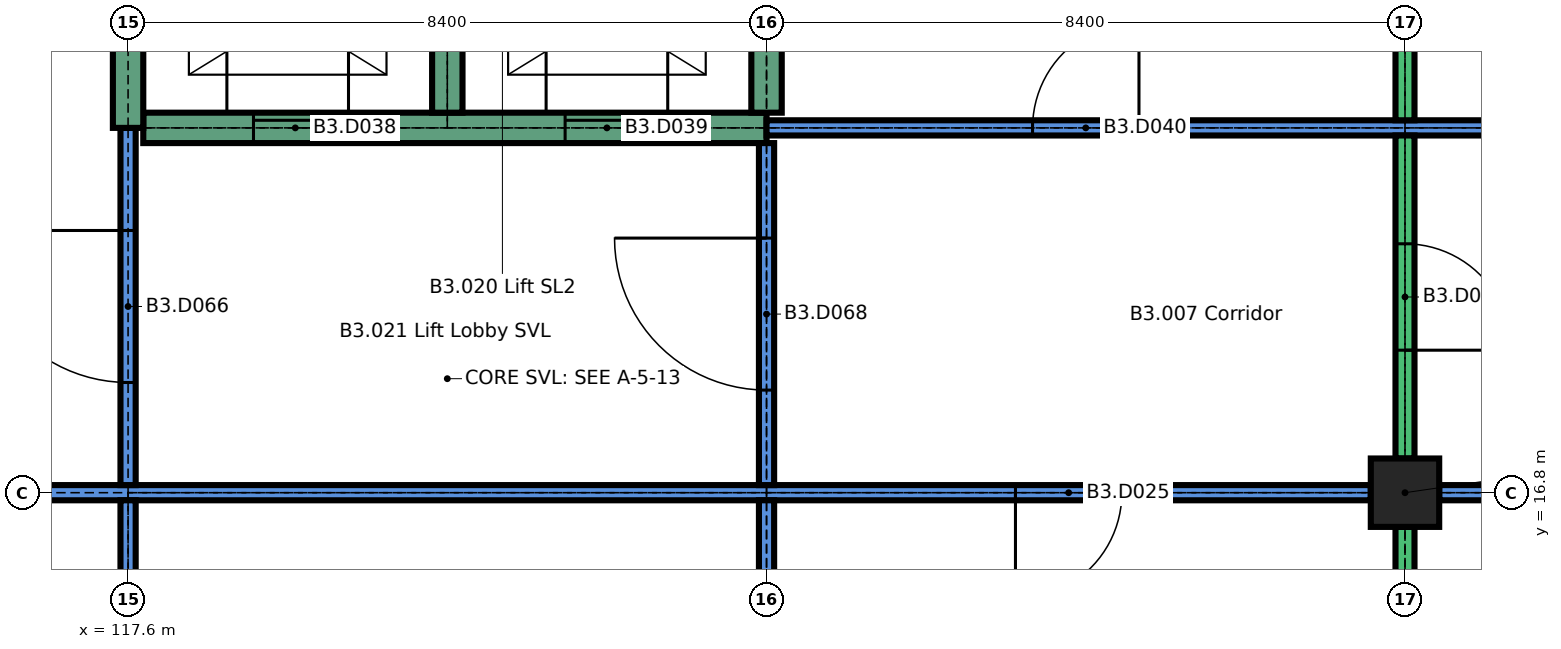
"""IFC4 building model, lengths in metres.
Left out: names, types, materials, properties, quantities, classifications, styles, units other than length and angle.
Written with IfcOpenShell. Run it as: python <this file> out.ifc"""

import sys

from ifc_helpers import new_model, si_unit, direction, frame, frame_2d, origin, origin_2d, place, context, subcontext, project, spatial, rectangle, extrude, element, fill, save


model = new_model("IFC4")
c1 = context("Model", 3, precision=1e-05, world=origin(), true_north=direction((0.0, 1.0)))
c2 = subcontext(c1, "Body", "Model", "MODEL_VIEW")
j1 = project(units=[si_unit("LENGTHUNIT", "METRE"), si_unit("PLANEANGLEUNIT", "RADIAN")], contexts=[c1])
p1 = place(None, origin())
s1 = spatial("IfcSite", under=j1, at=p1, CompositionType="ELEMENT")
p2 = place(p1, origin())
s2 = spatial("IfcBuilding", under=s1, at=p2, CompositionType="ELEMENT")
p3 = place(p2, frame((0.0, 0.0, -11.4)))
s3 = spatial("IfcBuildingStorey", under=s2, at=p3, CompositionType="ELEMENT", Elevation=-11.4)
p4 = place(p3, frame((134.4, 16.8, 0.0), z_axis=(0.0, 0.0, 1.0), x_axis=(1.0, 0.0, 0.0)))
e1 = element("IfcColumn", 1, at=p4, inside=s3, PredefinedType="COLUMN", context=c2, shape_type="SweptSolid", body=[
    extrude(rectangle(XDim=0.9, YDim=0.9, at=origin_2d()), origin(), (0.0, 0.0, 1.0), 3.2),
])
p5 = place(p3, frame((109.65, 16.8, 0.0), z_axis=(0.0, 0.0, 1.0), x_axis=(1.0, 0.0, 0.0)))
e2 = element("IfcWall", 2, at=p5, inside=s3, PredefinedType="PARTITIONING", context=c2, shape_type="SweptSolid", body=[
    extrude(rectangle(XDim=24.3, YDim=0.2, at=frame_2d((12.15, 0.0))), origin(), (0.0, 0.0, 1.0), 3.2),
])
p6 = place(p5, frame((3.275, 0.0, 0.0)))
e3 = element("IfcOpeningElement", 3, at=p6, cuts=e2, PredefinedType="OPENING", context=c2, shape_type="SweptSolid", body=[
    extrude(rectangle(XDim=1.4, YDim=2.1, at=frame_2d((0.7, 1.05))), frame((0.0, 0.11, 0.0), z_axis=(0.0, -1.0, 0.0), x_axis=(1.0, 0.0, 0.0)), (0.0, 0.0, 1.0), 0.22),
])
p7 = place(p5, frame((19.625, 0.0, 0.0)))
e4 = element("IfcOpeningElement", 4, at=p7, cuts=e2, PredefinedType="OPENING", context=c2, shape_type="SweptSolid", body=[
    extrude(rectangle(XDim=1.4, YDim=2.1, at=frame_2d((0.7, 1.05))), frame((0.0, 0.11, 0.0), z_axis=(0.0, -1.0, 0.0), x_axis=(1.0, 0.0, 0.0)), (0.0, 0.0, 1.0), 0.22),
])
p8 = place(p3, frame((134.85, 16.8, 0.0), z_axis=(0.0, 0.0, 1.0), x_axis=(1.0, 0.0, 0.0)))
e5 = element("IfcWall", 5, at=p8, inside=s3, PredefinedType="PARTITIONING", context=c2, shape_type="SweptSolid", body=[
    extrude(rectangle(XDim=7.5, YDim=0.2, at=frame_2d((3.75, 0.0))), origin(), (0.0, 0.0, 1.0), 3.2),
])
p9 = place(p8, frame((3.05, 0.0, 0.0)))
e6 = element("IfcOpeningElement", 6, at=p9, cuts=e5, PredefinedType="OPENING", context=c2, shape_type="SweptSolid", body=[
    extrude(rectangle(XDim=1.4, YDim=2.1, at=frame_2d((0.7, 1.05))), frame((0.0, 0.11, 0.0), z_axis=(0.0, -1.0, 0.0), x_axis=(1.0, 0.0, 0.0)), (0.0, 0.0, 1.0), 0.22),
])
p10 = place(p3, frame((117.8, 21.6, 0.0), z_axis=(0.0, 0.0, 1.0), x_axis=(1.0, 0.0, 0.0)))
e7 = element("IfcWall", 7, at=p10, inside=s3, PredefinedType="SHEAR", context=c2, shape_type="SweptSolid", body=[
    extrude(rectangle(XDim=8.2, YDim=0.4, at=frame_2d((4.1, 0.0))), origin(), (0.0, 0.0, 1.0), 3.2),
])
p11 = place(p10, frame((1.45, 0.0, 0.0)))
e8 = element("IfcOpeningElement", 8, at=p11, cuts=e7, PredefinedType="OPENING", context=c2, shape_type="SweptSolid", body=[
    extrude(rectangle(XDim=1.1, YDim=2.1, at=frame_2d((0.55, 1.05))), frame((0.0, 0.21, 0.0), z_axis=(0.0, -1.0, 0.0), x_axis=(1.0, 0.0, 0.0)), (0.0, 0.0, 1.0), 0.42),
])
p12 = place(p10, frame((5.55, 0.0, 0.0)))
e9 = element("IfcOpeningElement", 9, at=p12, cuts=e7, PredefinedType="OPENING", context=c2, shape_type="SweptSolid", body=[
    extrude(rectangle(XDim=1.1, YDim=2.1, at=frame_2d((0.55, 1.05))), frame((0.0, 0.21, 0.0), z_axis=(0.0, -1.0, 0.0), x_axis=(1.0, 0.0, 0.0)), (0.0, 0.0, 1.0), 0.42),
])
p13 = place(p3, frame((126.0, 21.6, 0.0), z_axis=(0.0, 0.0, 1.0), x_axis=(1.0, 0.0, 0.0)))
e10 = element("IfcWall", 10, at=p13, inside=s3, PredefinedType="PARTITIONING", context=c2, shape_type="SweptSolid", body=[
    extrude(rectangle(XDim=12.7, YDim=0.2, at=frame_2d((6.35, 0.0))), origin(), (0.0, 0.0, 1.0), 3.2),
])
p14 = place(p13, frame((3.5, 0.0, 0.0)))
e11 = element("IfcOpeningElement", 11, at=p14, cuts=e10, PredefinedType="OPENING", context=c2, shape_type="SweptSolid", body=[
    extrude(rectangle(XDim=1.4, YDim=2.1, at=frame_2d((0.7, 1.05))), frame((0.0, 0.11, 0.0), z_axis=(0.0, -1.0, 0.0), x_axis=(1.0, 0.0, 0.0)), (0.0, 0.0, 1.0), 0.22),
])
p15 = place(p13, frame((9.8, 0.0, 0.0)))
e12 = element("IfcOpeningElement", 12, at=p15, cuts=e10, PredefinedType="OPENING", context=c2, shape_type="SweptSolid", body=[
    extrude(rectangle(XDim=1.4, YDim=2.1, at=frame_2d((0.7, 1.05))), frame((0.0, 0.11, 0.0), z_axis=(0.0, -1.0, 0.0), x_axis=(1.0, 0.0, 0.0)), (0.0, 0.0, 1.0), 0.22),
])
p16 = place(p3, frame((117.6, 8.85, 0.0), z_axis=(0.0, 0.0, 1.0), x_axis=(0.0, 1.0, 0.0)))
e13 = element("IfcWall", 13, at=p16, inside=s3, PredefinedType="PARTITIONING", context=c2, shape_type="SweptSolid", body=[
    extrude(rectangle(XDim=7.85, YDim=0.2, at=frame_2d((3.925, 0.0))), origin(), (0.0, 0.0, 1.0), 3.2),
])
p17 = place(p16, frame((3.225, 0.0, 0.0)))
e14 = element("IfcOpeningElement", 14, at=p17, cuts=e13, PredefinedType="OPENING", context=c2, shape_type="SweptSolid", body=[
    extrude(rectangle(XDim=1.4, YDim=2.1, at=frame_2d((0.7, 1.05))), frame((0.0, 0.11, 0.0), z_axis=(0.0, -1.0, 0.0), x_axis=(1.0, 0.0, 0.0)), (0.0, 0.0, 1.0), 0.22),
])
p18 = place(p3, frame((117.6, 16.9, 0.0), z_axis=(0.0, 0.0, 1.0), x_axis=(0.0, 1.0, 0.0)))
e15 = element("IfcWall", 15, at=p18, inside=s3, PredefinedType="PARTITIONING", context=c2, shape_type="SweptSolid", body=[
    extrude(rectangle(XDim=4.7, YDim=0.2, at=frame_2d((2.35, 0.0))), origin(), (0.0, 0.0, 1.0), 3.2),
])
p19 = place(p18, frame((1.35, 0.0, 0.0)))
e16 = element("IfcOpeningElement", 16, at=p19, cuts=e15, PredefinedType="OPENING", context=c2, shape_type="SweptSolid", body=[
    extrude(rectangle(XDim=2.0, YDim=2.4, at=frame_2d((1.0, 1.2))), frame((0.0, 0.11, 0.0), z_axis=(0.0, -1.0, 0.0), x_axis=(1.0, 0.0, 0.0)), (0.0, 0.0, 1.0), 0.22),
])
p20 = place(p3, frame((117.6, 21.6, 0.0), z_axis=(0.0, 0.0, 1.0), x_axis=(0.0, 1.0, 0.0)))
e17 = element("IfcWall", 17, at=p20, inside=s3, PredefinedType="SHEAR", context=c2, shape_type="SweptSolid", body=[
    extrude(rectangle(XDim=3.6, YDim=0.4, at=frame_2d((1.8, 0.0))), origin(), (0.0, 0.0, 1.0), 3.2),
])
p21 = place(p3, frame((121.8, 21.8, 0.0), z_axis=(0.0, 0.0, 1.0), x_axis=(0.0, 1.0, 0.0)))
e18 = element("IfcWall", 18, at=p21, inside=s3, PredefinedType="SHEAR", context=c2, shape_type="SweptSolid", body=[
    extrude(rectangle(XDim=3.2, YDim=0.4, at=frame_2d((1.6, 0.0))), origin(), (0.0, 0.0, 1.0), 3.2),
])
p22 = place(p3, frame((126.0, 8.85, 0.0), z_axis=(0.0, 0.0, 1.0), x_axis=(0.0, 1.0, 0.0)))
e19 = element("IfcWall", 19, at=p22, inside=s3, PredefinedType="PARTITIONING", context=c2, shape_type="SweptSolid", body=[
    extrude(rectangle(XDim=7.85, YDim=0.2, at=frame_2d((3.925, 0.0))), origin(), (0.0, 0.0, 1.0), 3.2),
])
p23 = place(p3, frame((126.0, 16.9, 0.0), z_axis=(0.0, 0.0, 1.0), x_axis=(0.0, 1.0, 0.0)))
e20 = element("IfcWall", 20, at=p23, inside=s3, PredefinedType="PARTITIONING", context=c2, shape_type="SweptSolid", body=[
    extrude(rectangle(XDim=4.5, YDim=0.2, at=frame_2d((2.25, 0.0))), origin(), (0.0, 0.0, 1.0), 3.2),
])
p24 = place(p23, frame((1.25, 0.0, 0.0)))
e21 = element("IfcOpeningElement", 21, at=p24, cuts=e20, PredefinedType="OPENING", context=c2, shape_type="SweptSolid", body=[
    extrude(rectangle(XDim=2.0, YDim=2.4, at=frame_2d((1.0, 1.2))), frame((0.0, 0.11, 0.0), z_axis=(0.0, -1.0, 0.0), x_axis=(1.0, 0.0, 0.0)), (0.0, 0.0, 1.0), 0.22),
])
p25 = place(p3, frame((126.0, 21.8, 0.0), z_axis=(0.0, 0.0, 1.0), x_axis=(0.0, 1.0, 0.0)))
e22 = element("IfcWall", 22, at=p25, inside=s3, PredefinedType="SHEAR", context=c2, shape_type="SweptSolid", body=[
    extrude(rectangle(XDim=3.4, YDim=0.4, at=frame_2d((1.7, 0.0))), origin(), (0.0, 0.0, 1.0), 3.2),
])
p26 = place(p3, frame((134.4, 8.85, 0.0), z_axis=(0.0, 0.0, 1.0), x_axis=(0.0, 1.0, 0.0)))
e23 = element("IfcWall", 23, at=p26, inside=s3, PredefinedType="SOLIDWALL", context=c2, shape_type="SweptSolid", body=[
    extrude(rectangle(XDim=7.5, YDim=0.25, at=frame_2d((3.75, 0.0))), origin(), (0.0, 0.0, 1.0), 3.2),
])
p27 = place(p3, frame((134.4, 17.25, 0.0), z_axis=(0.0, 0.0, 1.0), x_axis=(0.0, 1.0, 0.0)))
e24 = element("IfcWall", 24, at=p27, inside=s3, PredefinedType="SOLIDWALL", context=c2, shape_type="SweptSolid", body=[
    extrude(rectangle(XDim=4.25, YDim=0.25, at=frame_2d((2.125, 0.0))), origin(), (0.0, 0.0, 1.0), 3.2),
])
p28 = place(p27, frame((1.425, 0.0, 0.0)))
e25 = element("IfcOpeningElement", 25, at=p28, cuts=e24, PredefinedType="OPENING", context=c2, shape_type="SweptSolid", body=[
    extrude(rectangle(XDim=1.4, YDim=2.1, at=frame_2d((0.7, 1.05))), frame((0.0, 0.135, 0.0), z_axis=(0.0, -1.0, 0.0), x_axis=(1.0, 0.0, 0.0)), (0.0, 0.0, 1.0), 0.27),
])
p29 = place(p3, frame((134.4, 21.7, 0.0), z_axis=(0.0, 0.0, 1.0), x_axis=(0.0, 1.0, 0.0)))
e26 = element("IfcWall", 26, at=p29, inside=s3, PredefinedType="SOLIDWALL", context=c2, shape_type="SweptSolid", body=[
    extrude(rectangle(XDim=3.05, YDim=0.25, at=frame_2d((1.525, 0.0))), origin(), (0.0, 0.0, 1.0), 3.2),
])
p30 = place(p7, origin())
e27 = element("IfcDoor", 27, at=p30, inside=s3, OperationType="SINGLE_SWING_LEFT", PredefinedType="DOOR", context=c2, shape_type="SweptSolid", body=[
    extrude(rectangle(XDim=1.4, YDim=2.1, at=frame_2d((0.7, 1.05))), frame((0.0, 0.025, 0.0), z_axis=(0.0, -1.0, 0.0), x_axis=(1.0, 0.0, 0.0)), (0.0, 0.0, 1.0), 0.05),
])
fill(e4, e27)
p31 = place(p11, origin())
e28 = element("IfcDoor", 28, at=p31, inside=s3, OperationType="SLIDING_TO_LEFT", PredefinedType="DOOR", context=c2, shape_type="SweptSolid", body=[
    extrude(rectangle(XDim=1.1, YDim=2.1, at=frame_2d((0.55, 1.05))), frame((0.0, 0.025, 0.0), z_axis=(0.0, -1.0, 0.0), x_axis=(1.0, 0.0, 0.0)), (0.0, 0.0, 1.0), 0.05),
])
fill(e8, e28)
p32 = place(p12, origin())
e29 = element("IfcDoor", 29, at=p32, inside=s3, OperationType="SLIDING_TO_LEFT", PredefinedType="DOOR", context=c2, shape_type="SweptSolid", body=[
    extrude(rectangle(XDim=1.1, YDim=2.1, at=frame_2d((0.55, 1.05))), frame((0.0, 0.025, 0.0), z_axis=(0.0, -1.0, 0.0), x_axis=(1.0, 0.0, 0.0)), (0.0, 0.0, 1.0), 0.05),
])
fill(e9, e29)
p33 = place(p14, origin())
e30 = element("IfcDoor", 30, at=p33, inside=s3, OperationType="SINGLE_SWING_LEFT", PredefinedType="DOOR", context=c2, shape_type="SweptSolid", body=[
    extrude(rectangle(XDim=1.4, YDim=2.1, at=frame_2d((0.7, 1.05))), frame((0.0, 0.025, 0.0), z_axis=(0.0, -1.0, 0.0), x_axis=(1.0, 0.0, 0.0)), (0.0, 0.0, 1.0), 0.05),
])
fill(e11, e30)
p34 = place(p19, origin())
e31 = element("IfcDoor", 31, at=p34, inside=s3, OperationType="SINGLE_SWING_LEFT", PredefinedType="DOOR", context=c2, shape_type="SweptSolid", body=[
    extrude(rectangle(XDim=2.0, YDim=2.4, at=frame_2d((1.0, 1.2))), frame((0.0, 0.03, 0.0), z_axis=(0.0, -1.0, 0.0), x_axis=(1.0, 0.0, 0.0)), (0.0, 0.0, 1.0), 0.06),
])
fill(e16, e31)
p35 = place(p24, origin())
e32 = element("IfcDoor", 32, at=p35, inside=s3, OperationType="SINGLE_SWING_LEFT", PredefinedType="DOOR", context=c2, shape_type="SweptSolid", body=[
    extrude(rectangle(XDim=2.0, YDim=2.4, at=frame_2d((1.0, 1.2))), frame((0.0, 0.03, 0.0), z_axis=(0.0, -1.0, 0.0), x_axis=(1.0, 0.0, 0.0)), (0.0, 0.0, 1.0), 0.06),
])
fill(e21, e32)
p36 = place(p28, origin())
e33 = element("IfcDoor", 33, at=p36, inside=s3, OperationType="SINGLE_SWING_LEFT", PredefinedType="DOOR", context=c2, shape_type="SweptSolid", body=[
    extrude(rectangle(XDim=1.4, YDim=2.1, at=frame_2d((0.7, 1.05))), frame((0.0, 0.03, 0.0), z_axis=(0.0, -1.0, 0.0), x_axis=(1.0, 0.0, 0.0)), (0.0, 0.0, 1.0), 0.06),
])
fill(e25, e33)
save(model, sys.argv[1])
